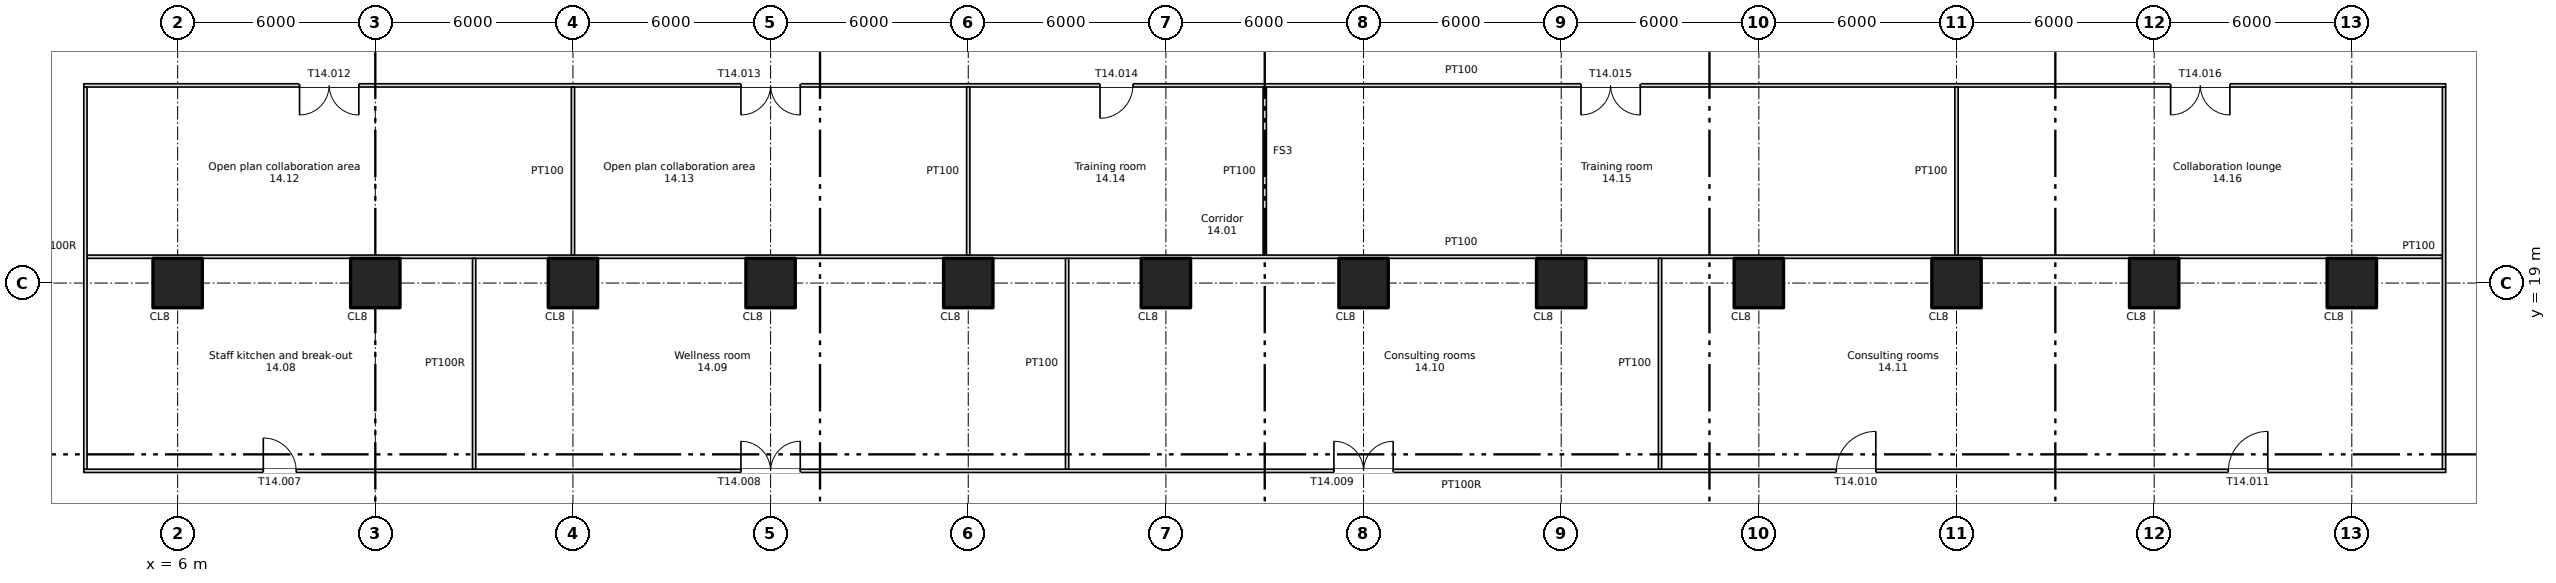
"""IFC4 building model, lengths in metres.
Left out: names, types, materials, properties, quantities, classifications, styles, units other than length and angle.
Written with IfcOpenShell. Run it as: python <this file> out.ifc"""

import sys

from ifc_helpers import new_model, si_unit, direction, frame, frame_2d, origin, origin_2d, place, context, subcontext, project, spatial, rectangle, extrude, element, fill, save


model = new_model("IFC4")
c1 = context("Model", 3, precision=1e-05, world=origin(), true_north=direction((0.0, 1.0)))
c2 = subcontext(c1, "Body", "Model", "MODEL_VIEW")
j1 = project(units=[si_unit("LENGTHUNIT", "METRE"), si_unit("PLANEANGLEUNIT", "RADIAN")], contexts=[c1])
p1 = place(None, origin())
s1 = spatial("IfcSite", under=j1, at=p1, CompositionType="ELEMENT")
p2 = place(p1, origin())
s2 = spatial("IfcBuilding", under=s1, at=p2, CompositionType="ELEMENT")
p3 = place(p2, frame((0.0, 0.0, 78.75)))
s3 = spatial("IfcBuildingStorey", under=s2, at=p3, CompositionType="ELEMENT", Elevation=78.75)
for number, where, z_axis, x_axis in (
    (1, (6.0, 19.0, 0.0), (0.0, 0.0, 1.0), (1.0, 0.0, 0.0)),
    (2, (12.0, 19.0, 0.0), (0.0, 0.0, 1.0), (1.0, 0.0, 0.0)),
    (3, (18.0, 19.0, 0.0), (0.0, 0.0, 1.0), (1.0, 0.0, 0.0)),
    (4, (24.0, 19.0, 0.0), (0.0, 0.0, 1.0), (1.0, 0.0, 0.0)),
    (5, (30.0, 19.0, 0.0), (0.0, 0.0, 1.0), (1.0, 0.0, 0.0)),
    (6, (36.0, 19.0, 0.0), (0.0, 0.0, 1.0), (1.0, 0.0, 0.0)),
    (7, (42.0, 19.0, 0.0), (0.0, 0.0, 1.0), (1.0, 0.0, 0.0)),
    (8, (48.0, 19.0, 0.0), (0.0, 0.0, 1.0), (1.0, 0.0, 0.0)),
    (9, (54.0, 19.0, 0.0), (0.0, 0.0, 1.0), (1.0, 0.0, 0.0)),
    (10, (60.0, 19.0, 0.0), (0.0, 0.0, 1.0), (1.0, 0.0, 0.0)),
    (11, (66.0, 19.0, 0.0), (0.0, 0.0, 1.0), (1.0, 0.0, 0.0)),
    (12, (72.0, 19.0, 0.0), (0.0, 0.0, 1.0), (1.0, 0.0, 0.0)),
):
    element("IfcColumn", number, at=place(p3, frame(where, z_axis=z_axis, x_axis=x_axis)), inside=s3, PredefinedType="COLUMN", context=c2, shape_type="SweptSolid", body=[
        extrude(rectangle(XDim=1.5, YDim=1.5, at=origin_2d()), origin(), (0.0, 0.0, 1.0), 3.35),
    ])
p4 = place(p3, frame((3.15, 13.3, 0.0), z_axis=(0.0, 0.0, 1.0), x_axis=(1.0, 0.0, 0.0)))
e13 = element("IfcWall", 13, at=p4, inside=s3, PredefinedType="PARTITIONING", context=c2, shape_type="SweptSolid", body=[
    extrude(rectangle(XDim=71.7, YDim=0.1, at=frame_2d((35.85, 0.0))), origin(), (0.0, 0.0, 1.0), 3.35),
])
p5 = place(p4, frame((5.45, 0.0, 0.0)))
e14 = element("IfcOpeningElement", 14, at=p5, cuts=e13, PredefinedType="OPENING", context=c2, shape_type="SweptSolid", body=[
    extrude(rectangle(XDim=1.0, YDim=2.1, at=frame_2d((0.5, 1.05))), frame((0.0, 0.06, 0.0), z_axis=(0.0, -1.0, 0.0), x_axis=(1.0, 0.0, 0.0)), (0.0, 0.0, 1.0), 0.12),
])
p6 = place(p4, frame((19.95, 0.0, 0.0)))
e15 = element("IfcOpeningElement", 15, at=p6, cuts=e13, PredefinedType="OPENING", context=c2, shape_type="SweptSolid", body=[
    extrude(rectangle(XDim=1.8, YDim=2.1, at=frame_2d((0.9, 1.05))), frame((0.0, 0.06, 0.0), z_axis=(0.0, -1.0, 0.0), x_axis=(1.0, 0.0, 0.0)), (0.0, 0.0, 1.0), 0.12),
])
p7 = place(p4, frame((37.95, 0.0, 0.0)))
e16 = element("IfcOpeningElement", 16, at=p7, cuts=e13, PredefinedType="OPENING", context=c2, shape_type="SweptSolid", body=[
    extrude(rectangle(XDim=1.8, YDim=2.1, at=frame_2d((0.9, 1.05))), frame((0.0, 0.06, 0.0), z_axis=(0.0, -1.0, 0.0), x_axis=(1.0, 0.0, 0.0)), (0.0, 0.0, 1.0), 0.12),
])
p8 = place(p4, frame((53.2, 0.0, 0.0)))
e17 = element("IfcOpeningElement", 17, at=p8, cuts=e13, PredefinedType="OPENING", context=c2, shape_type="SweptSolid", body=[
    extrude(rectangle(XDim=1.2, YDim=2.1, at=frame_2d((0.6, 1.05))), frame((0.0, 0.06, 0.0), z_axis=(0.0, -1.0, 0.0), x_axis=(1.0, 0.0, 0.0)), (0.0, 0.0, 1.0), 0.12),
])
p9 = place(p4, frame((65.1, 0.0, 0.0)))
e18 = element("IfcOpeningElement", 18, at=p9, cuts=e13, PredefinedType="OPENING", context=c2, shape_type="SweptSolid", body=[
    extrude(rectangle(XDim=1.2, YDim=2.1, at=frame_2d((0.6, 1.05))), frame((0.0, 0.06, 0.0), z_axis=(0.0, -1.0, 0.0), x_axis=(1.0, 0.0, 0.0)), (0.0, 0.0, 1.0), 0.12),
])
p10 = place(p3, frame((3.25, 19.8, 0.0), z_axis=(0.0, 0.0, 1.0), x_axis=(1.0, 0.0, 0.0)))
e19 = element("IfcWall", 19, at=p10, inside=s3, PredefinedType="PARTITIONING", context=c2, shape_type="SweptSolid", body=[
    extrude(rectangle(XDim=71.5, YDim=0.1, at=frame_2d((35.75, 0.0))), origin(), (0.0, 0.0, 1.0), 3.35),
])
p11 = place(p3, frame((3.15, 25.0, 0.0), z_axis=(0.0, 0.0, 1.0), x_axis=(1.0, 0.0, 0.0)))
e20 = element("IfcWall", 20, at=p11, inside=s3, PredefinedType="PARTITIONING", context=c2, shape_type="SweptSolid", body=[
    extrude(rectangle(XDim=71.7, YDim=0.1, at=frame_2d((35.85, 0.0))), origin(), (0.0, 0.0, 1.0), 3.35),
])
p12 = place(p11, frame((6.55, 0.0, 0.0)))
e21 = element("IfcOpeningElement", 21, at=p12, cuts=e20, PredefinedType="OPENING", context=c2, shape_type="SweptSolid", body=[
    extrude(rectangle(XDim=1.8, YDim=2.1, at=frame_2d((0.9, 1.05))), frame((0.0, 0.06, 0.0), z_axis=(0.0, -1.0, 0.0), x_axis=(1.0, 0.0, 0.0)), (0.0, 0.0, 1.0), 0.12),
])
p13 = place(p11, frame((19.95, 0.0, 0.0)))
e22 = element("IfcOpeningElement", 22, at=p13, cuts=e20, PredefinedType="OPENING", context=c2, shape_type="SweptSolid", body=[
    extrude(rectangle(XDim=1.8, YDim=2.1, at=frame_2d((0.9, 1.05))), frame((0.0, 0.06, 0.0), z_axis=(0.0, -1.0, 0.0), x_axis=(1.0, 0.0, 0.0)), (0.0, 0.0, 1.0), 0.12),
])
p14 = place(p11, frame((30.85, 0.0, 0.0)))
e23 = element("IfcOpeningElement", 23, at=p14, cuts=e20, PredefinedType="OPENING", context=c2, shape_type="SweptSolid", body=[
    extrude(rectangle(XDim=1.0, YDim=2.1, at=frame_2d((0.5, 1.05))), frame((0.0, 0.06, 0.0), z_axis=(0.0, -1.0, 0.0), x_axis=(1.0, 0.0, 0.0)), (0.0, 0.0, 1.0), 0.12),
])
p15 = place(p11, frame((45.45, 0.0, 0.0)))
e24 = element("IfcOpeningElement", 24, at=p15, cuts=e20, PredefinedType="OPENING", context=c2, shape_type="SweptSolid", body=[
    extrude(rectangle(XDim=1.8, YDim=2.1, at=frame_2d((0.9, 1.05))), frame((0.0, 0.06, 0.0), z_axis=(0.0, -1.0, 0.0), x_axis=(1.0, 0.0, 0.0)), (0.0, 0.0, 1.0), 0.12),
])
p16 = place(p11, frame((63.35, 0.0, 0.0)))
e25 = element("IfcOpeningElement", 25, at=p16, cuts=e20, PredefinedType="OPENING", context=c2, shape_type="SweptSolid", body=[
    extrude(rectangle(XDim=1.8, YDim=2.1, at=frame_2d((0.9, 1.05))), frame((0.0, 0.06, 0.0), z_axis=(0.0, -1.0, 0.0), x_axis=(1.0, 0.0, 0.0)), (0.0, 0.0, 1.0), 0.12),
])
p17 = place(p3, frame((3.2, 13.35, 0.0), z_axis=(0.0, 0.0, 1.0), x_axis=(0.0, 1.0, 0.0)))
e26 = element("IfcWall", 26, at=p17, inside=s3, PredefinedType="PARTITIONING", context=c2, shape_type="SweptSolid", body=[
    extrude(rectangle(XDim=11.6, YDim=0.1, at=frame_2d((5.8, 0.0))), origin(), (0.0, 0.0, 1.0), 3.35),
])
p18 = place(p3, frame((15.0, 13.35, 0.0), z_axis=(0.0, 0.0, 1.0), x_axis=(0.0, 1.0, 0.0)))
e27 = element("IfcWall", 27, at=p18, inside=s3, PredefinedType="PARTITIONING", context=c2, shape_type="SweptSolid", body=[
    extrude(rectangle(XDim=6.4, YDim=0.1, at=frame_2d((3.2, 0.0))), origin(), (0.0, 0.0, 1.0), 3.35),
])
for number, where, z_axis, x_axis in (
    (28, (18.0, 19.85, 0.0), (0.0, 0.0, 1.0), (0.0, 1.0, 0.0)),
    (29, (30.0, 19.85, 0.0), (0.0, 0.0, 1.0), (0.0, 1.0, 0.0)),
):
    element("IfcWall", number, at=place(p3, frame(where, z_axis=z_axis, x_axis=x_axis)), inside=s3, PredefinedType="PARTITIONING", context=c2, shape_type="SweptSolid", body=[
        extrude(rectangle(XDim=5.1, YDim=0.1, at=frame_2d((2.55, 0.0))), origin(), (0.0, 0.0, 1.0), 3.35),
    ])
p19 = place(p3, frame((33.0, 13.35, 0.0), z_axis=(0.0, 0.0, 1.0), x_axis=(0.0, 1.0, 0.0)))
e30 = element("IfcWall", 30, at=p19, inside=s3, PredefinedType="PARTITIONING", context=c2, shape_type="SweptSolid", body=[
    extrude(rectangle(XDim=6.4, YDim=0.1, at=frame_2d((3.2, 0.0))), origin(), (0.0, 0.0, 1.0), 3.35),
])
p20 = place(p3, frame((39.0, 19.85, 0.0), z_axis=(0.0, 0.0, 1.0), x_axis=(0.0, 1.0, 0.0)))
e31 = element("IfcWall", 31, at=p20, inside=s3, PredefinedType="PARTITIONING", context=c2, shape_type="SweptSolid", body=[
    extrude(rectangle(XDim=5.1, YDim=0.1, at=frame_2d((2.55, 0.0))), origin(), (0.0, 0.0, 1.0), 3.35),
])
p21 = place(p3, frame((51.0, 13.35, 0.0), z_axis=(0.0, 0.0, 1.0), x_axis=(0.0, 1.0, 0.0)))
e32 = element("IfcWall", 32, at=p21, inside=s3, PredefinedType="PARTITIONING", context=c2, shape_type="SweptSolid", body=[
    extrude(rectangle(XDim=6.4, YDim=0.1, at=frame_2d((3.2, 0.0))), origin(), (0.0, 0.0, 1.0), 3.35),
])
p22 = place(p3, frame((60.0, 19.85, 0.0), z_axis=(0.0, 0.0, 1.0), x_axis=(0.0, 1.0, 0.0)))
e33 = element("IfcWall", 33, at=p22, inside=s3, PredefinedType="PARTITIONING", context=c2, shape_type="SweptSolid", body=[
    extrude(rectangle(XDim=5.1, YDim=0.1, at=frame_2d((2.55, 0.0))), origin(), (0.0, 0.0, 1.0), 3.35),
])
p23 = place(p3, frame((74.8, 13.35, 0.0), z_axis=(0.0, 0.0, 1.0), x_axis=(0.0, 1.0, 0.0)))
e34 = element("IfcWall", 34, at=p23, inside=s3, PredefinedType="PARTITIONING", context=c2, shape_type="SweptSolid", body=[
    extrude(rectangle(XDim=11.6, YDim=0.1, at=frame_2d((5.8, 0.0))), origin(), (0.0, 0.0, 1.0), 3.35),
])
p24 = place(p5, origin())
e35 = element("IfcDoor", 35, at=p24, inside=s3, OperationType="SINGLE_SWING_LEFT", PredefinedType="DOOR", context=c2, shape_type="SweptSolid", body=[
    extrude(rectangle(XDim=1.0, YDim=2.1, at=frame_2d((0.5, 1.05))), frame((0.0, 0.025, 0.0), z_axis=(0.0, -1.0, 0.0), x_axis=(1.0, 0.0, 0.0)), (0.0, 0.0, 1.0), 0.05),
])
fill(e14, e35)
p25 = place(p6, origin())
e36 = element("IfcDoor", 36, at=p25, inside=s3, OperationType="DOUBLE_DOOR_SINGLE_SWING", PredefinedType="DOOR", context=c2, shape_type="SweptSolid", body=[
    extrude(rectangle(XDim=1.8, YDim=2.1, at=frame_2d((0.9, 1.05))), frame((0.0, 0.025, 0.0), z_axis=(0.0, -1.0, 0.0), x_axis=(1.0, 0.0, 0.0)), (0.0, 0.0, 1.0), 0.05),
])
fill(e15, e36)
p26 = place(p7, origin())
e37 = element("IfcDoor", 37, at=p26, inside=s3, OperationType="DOUBLE_DOOR_SINGLE_SWING", PredefinedType="DOOR", context=c2, shape_type="SweptSolid", body=[
    extrude(rectangle(XDim=1.8, YDim=2.1, at=frame_2d((0.9, 1.05))), frame((0.0, 0.025, 0.0), z_axis=(0.0, -1.0, 0.0), x_axis=(1.0, 0.0, 0.0)), (0.0, 0.0, 1.0), 0.05),
])
fill(e16, e37)
p27 = place(p8, origin())
e38 = element("IfcDoor", 38, at=p27, inside=s3, OperationType="SINGLE_SWING_RIGHT", PredefinedType="DOOR", context=c2, shape_type="SweptSolid", body=[
    extrude(rectangle(XDim=1.2, YDim=2.1, at=frame_2d((0.6, 1.05))), frame((0.0, 0.025, 0.0), z_axis=(0.0, -1.0, 0.0), x_axis=(1.0, 0.0, 0.0)), (0.0, 0.0, 1.0), 0.05),
])
fill(e17, e38)
p28 = place(p9, origin())
e39 = element("IfcDoor", 39, at=p28, inside=s3, OperationType="SINGLE_SWING_RIGHT", PredefinedType="DOOR", context=c2, shape_type="SweptSolid", body=[
    extrude(rectangle(XDim=1.2, YDim=2.1, at=frame_2d((0.6, 1.05))), frame((0.0, 0.025, 0.0), z_axis=(0.0, -1.0, 0.0), x_axis=(1.0, 0.0, 0.0)), (0.0, 0.0, 1.0), 0.05),
])
fill(e18, e39)
p29 = place(p12, origin())
e40 = element("IfcDoor", 40, at=p29, inside=s3, OperationType="DOUBLE_DOOR_SINGLE_SWING", PredefinedType="DOOR", context=c2, shape_type="SweptSolid", body=[
    extrude(rectangle(XDim=1.8, YDim=2.1, at=frame_2d((0.9, 1.05))), frame((0.0, 0.025, 0.0), z_axis=(0.0, -1.0, 0.0), x_axis=(1.0, 0.0, 0.0)), (0.0, 0.0, 1.0), 0.05),
])
fill(e21, e40)
p30 = place(p13, origin())
e41 = element("IfcDoor", 41, at=p30, inside=s3, OperationType="DOUBLE_DOOR_SINGLE_SWING", PredefinedType="DOOR", context=c2, shape_type="SweptSolid", body=[
    extrude(rectangle(XDim=1.8, YDim=2.1, at=frame_2d((0.9, 1.05))), frame((0.0, 0.025, 0.0), z_axis=(0.0, -1.0, 0.0), x_axis=(1.0, 0.0, 0.0)), (0.0, 0.0, 1.0), 0.05),
])
fill(e22, e41)
p31 = place(p14, origin())
e42 = element("IfcDoor", 42, at=p31, inside=s3, OperationType="SINGLE_SWING_LEFT", PredefinedType="DOOR", context=c2, shape_type="SweptSolid", body=[
    extrude(rectangle(XDim=1.0, YDim=2.1, at=frame_2d((0.5, 1.05))), frame((0.0, 0.025, 0.0), z_axis=(0.0, -1.0, 0.0), x_axis=(1.0, 0.0, 0.0)), (0.0, 0.0, 1.0), 0.05),
])
fill(e23, e42)
p32 = place(p15, origin())
e43 = element("IfcDoor", 43, at=p32, inside=s3, OperationType="DOUBLE_DOOR_SINGLE_SWING", PredefinedType="DOOR", context=c2, shape_type="SweptSolid", body=[
    extrude(rectangle(XDim=1.8, YDim=2.1, at=frame_2d((0.9, 1.05))), frame((0.0, 0.025, 0.0), z_axis=(0.0, -1.0, 0.0), x_axis=(1.0, 0.0, 0.0)), (0.0, 0.0, 1.0), 0.05),
])
fill(e24, e43)
p33 = place(p16, origin())
e44 = element("IfcDoor", 44, at=p33, inside=s3, OperationType="DOUBLE_DOOR_SINGLE_SWING", PredefinedType="DOOR", context=c2, shape_type="SweptSolid", body=[
    extrude(rectangle(XDim=1.8, YDim=2.1, at=frame_2d((0.9, 1.05))), frame((0.0, 0.025, 0.0), z_axis=(0.0, -1.0, 0.0), x_axis=(1.0, 0.0, 0.0)), (0.0, 0.0, 1.0), 0.05),
])
fill(e25, e44)
save(model, sys.argv[1])
